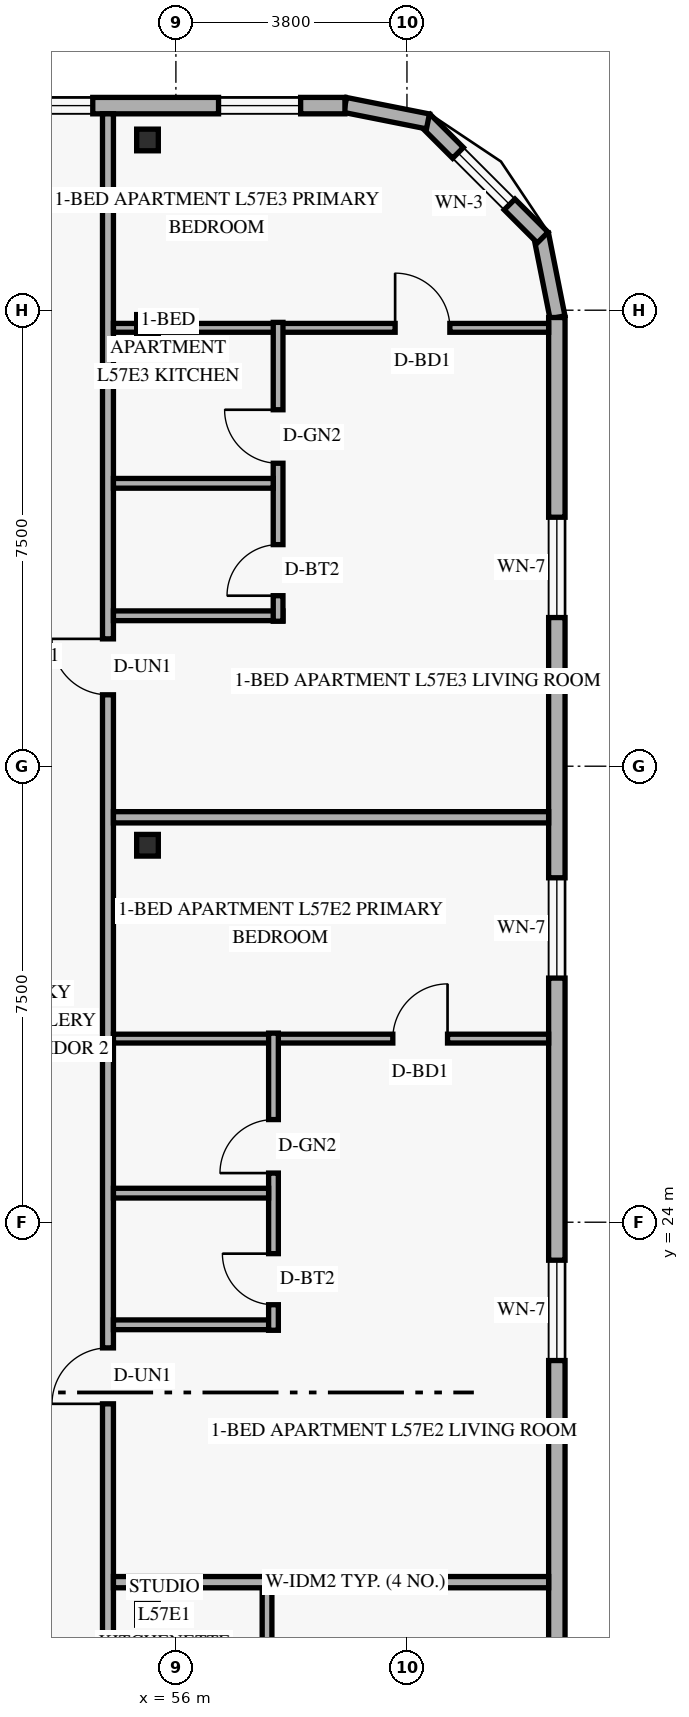
"""IFC4 building model, lengths in metres.
Left out: names, types, materials, properties, quantities, classifications, styles, units other than length and angle.
Written with IfcOpenShell. Run it as: python <this file> out.ifc"""

import sys

from ifc_helpers import new_model, si_unit, direction, frame, frame_2d, origin, origin_2d, place, context, subcontext, project, spatial, rectangle, hollow_rectangle, extrude, element, fill, save


model = new_model("IFC4")
c1 = context("Model", 3, precision=1e-05, world=origin(), true_north=direction((0.0, 1.0)))
c2 = subcontext(c1, "Body", "Model", "MODEL_VIEW")
j1 = project(units=[si_unit("LENGTHUNIT", "METRE"), si_unit("PLANEANGLEUNIT", "RADIAN")], contexts=[c1])
p1 = place(None, origin())
s1 = spatial("IfcSite", under=j1, at=p1, CompositionType="ELEMENT")
p2 = place(p1, origin())
s2 = spatial("IfcBuilding", under=s1, at=p2, CompositionType="ELEMENT")
p3 = place(p2, frame((0.0, 0.0, 220.2)))
s3 = spatial("IfcBuildingStorey", under=s2, at=p3, CompositionType="ELEMENT", Elevation=220.2)
for number, where, z_axis, x_axis in (
    (1, (55.428, 17.55, 0.0), (0.058, 0.0, 0.998), (0.0, 1.0, 0.0)),
    (2, (55.428, 30.2, 0.0), (0.058, 0.0, 0.998), (0.0, 1.0, 0.0)),
    (3, (55.428, 38.75, 0.0), (0.058, 0.0, 0.998), (0.0, 1.0, 0.0)),
    (4, (55.428, 41.8, 0.0), (0.058, 0.0, 0.998), (0.0, 1.0, 0.0)),
):
    element("IfcColumn", number, at=place(p3, frame(where, z_axis=z_axis, x_axis=x_axis)), inside=s3, PredefinedType="COLUMN", context=c2, shape_type="SweptSolid", body=[
        extrude(hollow_rectangle(XDim=0.356, YDim=0.356, WallThickness=0.016, at=origin_2d()), origin(), (0.0, 0.0, 1.0), 3.606),
    ])
p4 = place(p3, frame((62.276, 38.884, 0.0), z_axis=(0.0, 0.0, 1.0), x_axis=(-0.195135625965, 0.9807762678, 0.0)))
e5 = element("IfcWall", 5, at=p4, inside=s3, PredefinedType="SOLIDWALL", context=c2, shape_type="SweptSolid", body=[
    extrude(rectangle(XDim=1.389, YDim=0.25, at=frame_2d((0.694, 0.0))), origin(), (0.0, 0.0, 1.0), 3.36),
])
p5 = place(p3, frame((62.032, 40.195, 0.0), z_axis=(0.0, 0.0, 1.0), x_axis=(-0.707106781187, 0.707106781187, 0.0)))
e6 = element("IfcWall", 6, at=p5, inside=s3, PredefinedType="SOLIDWALL", context=c2, shape_type="SweptSolid", body=[
    extrude(rectangle(XDim=2.739, YDim=0.25, at=frame_2d((1.37, 0.0))), origin(), (0.0, 0.0, 1.0), 3.36),
])
p6 = place(p5, frame((0.77, 0.0, 0.85)))
e7 = element("IfcOpeningElement", 7, at=p6, cuts=e6, PredefinedType="OPENING", context=c2, shape_type="SweptSolid", body=[
    extrude(rectangle(XDim=1.2, YDim=1.5, at=frame_2d((0.6, 0.75))), frame((0.0, 0.135, 0.0), z_axis=(0.0, -1.0, 0.0), x_axis=(1.0, 0.0, 0.0)), (0.0, 0.0, 1.0), 0.27),
])
p7 = place(p3, frame((60.146, 42.105, 0.0), z_axis=(0.0, 0.0, 1.0), x_axis=(-0.980809899341, 0.19496651342, 0.0)))
e8 = element("IfcWall", 8, at=p7, inside=s3, PredefinedType="SOLIDWALL", context=c2, shape_type="SweptSolid", body=[
    extrude(rectangle(XDim=1.389, YDim=0.25, at=frame_2d((0.694, 0.0))), origin(), (0.0, 0.0, 1.0), 3.36),
])
p8 = place(p3, frame((62.265, 9.12, 0.0), z_axis=(0.0, 0.0, 1.0), x_axis=(0.0, 1.0, 0.0)))
e9 = element("IfcWall", 9, at=p8, inside=s3, PredefinedType="SOLIDWALL", context=c2, shape_type="SweptSolid", body=[
    extrude(rectangle(XDim=29.76, YDim=0.27, at=frame_2d((14.88, 0.0))), origin(), (0.0, 0.0, 1.0), 3.36),
])
p9 = place(p8, frame((3.655, 0.0, 0.85)))
e10 = element("IfcOpeningElement", 10, at=p9, cuts=e9, PredefinedType="OPENING", context=c2, shape_type="SweptSolid", body=[
    extrude(rectangle(XDim=1.65, YDim=1.6, at=frame_2d((0.825, 0.8))), frame((0.0, 0.145, 0.0), z_axis=(0.0, -1.0, 0.0), x_axis=(1.0, 0.0, 0.0)), (0.0, 0.0, 1.0), 0.29),
])
p10 = place(p8, frame((12.605, 0.0, 0.85)))
e11 = element("IfcOpeningElement", 11, at=p10, cuts=e9, PredefinedType="OPENING", context=c2, shape_type="SweptSolid", body=[
    extrude(rectangle(XDim=1.65, YDim=1.6, at=frame_2d((0.825, 0.8))), frame((0.0, 0.145, 0.0), z_axis=(0.0, -1.0, 0.0), x_axis=(1.0, 0.0, 0.0)), (0.0, 0.0, 1.0), 0.29),
])
p11 = place(p8, frame((18.895, 0.0, 0.85)))
e12 = element("IfcOpeningElement", 12, at=p11, cuts=e9, PredefinedType="OPENING", context=c2, shape_type="SweptSolid", body=[
    extrude(rectangle(XDim=1.65, YDim=1.6, at=frame_2d((0.825, 0.8))), frame((0.0, 0.145, 0.0), z_axis=(0.0, -1.0, 0.0), x_axis=(1.0, 0.0, 0.0)), (0.0, 0.0, 1.0), 0.29),
])
p12 = place(p8, frame((24.825, 0.0, 0.85)))
e13 = element("IfcOpeningElement", 13, at=p12, cuts=e9, PredefinedType="OPENING", context=c2, shape_type="SweptSolid", body=[
    extrude(rectangle(XDim=1.65, YDim=1.6, at=frame_2d((0.825, 0.8))), frame((0.0, 0.145, 0.0), z_axis=(0.0, -1.0, 0.0), x_axis=(1.0, 0.0, 0.0)), (0.0, 0.0, 1.0), 0.29),
])
p13 = place(p3, frame((58.78, 42.365, 0.0), z_axis=(0.0, 0.0, 1.0), x_axis=(-1.0, 0.0, 0.0)))
e14 = element("IfcWall", 14, at=p13, inside=s3, PredefinedType="SOLIDWALL", context=c2, shape_type="SweptSolid", body=[
    extrude(rectangle(XDim=32.96, YDim=0.27, at=frame_2d((16.48, 0.0))), origin(), (0.0, 0.0, 1.0), 3.36),
])
p14 = place(p13, frame((27.815, 0.0, 0.85)))
e15 = element("IfcOpeningElement", 15, at=p14, cuts=e14, PredefinedType="OPENING", context=c2, shape_type="SweptSolid", body=[
    extrude(rectangle(XDim=1.35, YDim=1.55, at=frame_2d((0.675, 0.775))), frame((0.0, 0.145, 0.0), z_axis=(0.0, -1.0, 0.0), x_axis=(1.0, 0.0, 0.0)), (0.0, 0.0, 1.0), 0.29),
])
p15 = place(p13, frame((15.022, 0.0, 0.85)))
e16 = element("IfcOpeningElement", 16, at=p15, cuts=e14, PredefinedType="OPENING", context=c2, shape_type="SweptSolid", body=[
    extrude(rectangle(XDim=1.35, YDim=1.55, at=frame_2d((0.675, 0.775))), frame((0.0, 0.145, 0.0), z_axis=(0.0, -1.0, 0.0), x_axis=(1.0, 0.0, 0.0)), (0.0, 0.0, 1.0), 0.29),
])
p16 = place(p13, frame((4.147, 0.0, 0.85)))
e17 = element("IfcOpeningElement", 17, at=p16, cuts=e14, PredefinedType="OPENING", context=c2, shape_type="SweptSolid", body=[
    extrude(rectangle(XDim=1.35, YDim=1.55, at=frame_2d((0.675, 0.775))), frame((0.0, 0.145, 0.0), z_axis=(0.0, -1.0, 0.0), x_axis=(1.0, 0.0, 0.0)), (0.0, 0.0, 1.0), 0.29),
])
p17 = place(p13, frame((0.729, 0.0, 0.85)))
e18 = element("IfcOpeningElement", 18, at=p17, cuts=e14, PredefinedType="OPENING", context=c2, shape_type="SweptSolid", body=[
    extrude(rectangle(XDim=1.35, YDim=1.55, at=frame_2d((0.675, 0.775))), frame((0.0, 0.145, 0.0), z_axis=(0.0, -1.0, 0.0), x_axis=(1.0, 0.0, 0.0)), (0.0, 0.0, 1.0), 0.29),
])
p18 = place(p3, frame((54.883, 5.77, 0.0), z_axis=(0.0, 0.0, 1.0), x_axis=(0.0, 1.0, 0.0)))
e19 = element("IfcWall", 19, at=p18, inside=s3, PredefinedType="STANDARD", context=c2, shape_type="SweptSolid", body=[
    extrude(rectangle(XDim=36.46, YDim=0.18, at=frame_2d((18.23, 0.0))), origin(), (0.0, 0.0, 1.0), 2.803),
])
p19 = place(p18, frame((6.37, 0.0, 0.0)))
e20 = element("IfcOpeningElement", 20, at=p19, cuts=e19, PredefinedType="OPENING", context=c2, shape_type="SweptSolid", body=[
    extrude(rectangle(XDim=0.92, YDim=2.15, at=frame_2d((0.46, 1.075))), frame((0.0, 0.1, 0.0), z_axis=(0.0, -1.0, 0.0), x_axis=(1.0, 0.0, 0.0)), (0.0, 0.0, 1.0), 0.2),
])
p20 = place(p18, frame((15.243, 0.0, 0.0)))
e21 = element("IfcOpeningElement", 21, at=p20, cuts=e19, PredefinedType="OPENING", context=c2, shape_type="SweptSolid", body=[
    extrude(rectangle(XDim=0.92, YDim=2.15, at=frame_2d((0.46, 1.075))), frame((0.0, 0.1, 0.0), z_axis=(0.0, -1.0, 0.0), x_axis=(1.0, 0.0, 0.0)), (0.0, 0.0, 1.0), 0.2),
])
p21 = place(p18, frame((26.905, 0.0, 0.0)))
e22 = element("IfcOpeningElement", 22, at=p21, cuts=e19, PredefinedType="OPENING", context=c2, shape_type="SweptSolid", body=[
    extrude(rectangle(XDim=0.92, YDim=2.15, at=frame_2d((0.46, 1.075))), frame((0.0, 0.1, 0.0), z_axis=(0.0, -1.0, 0.0), x_axis=(1.0, 0.0, 0.0)), (0.0, 0.0, 1.0), 0.2),
])
p22 = place(p3, frame((57.499, 13.35, 0.0), z_axis=(0.0, 0.0, 1.0), x_axis=(0.0, 1.0, 0.0)))
e23 = element("IfcWall", 23, at=p22, inside=s3, PredefinedType="PLUMBINGWALL", context=c2, shape_type="SweptSolid", body=[
    extrude(rectangle(XDim=4.73, YDim=0.16, at=frame_2d((2.365, 0.0))), origin(), (0.0, 0.0, 1.0), 3.36),
])
p23 = place(p22, frame((0.42, 0.0, 0.0)))
e24 = element("IfcOpeningElement", 24, at=p23, cuts=e23, PredefinedType="OPENING", context=c2, shape_type="SweptSolid", body=[
    extrude(rectangle(XDim=0.84, YDim=2.12, at=frame_2d((0.42, 1.06))), frame((0.0, 0.09, 0.0), z_axis=(0.0, -1.0, 0.0), x_axis=(1.0, 0.0, 0.0)), (0.0, 0.0, 1.0), 0.18),
])
p24 = place(p22, frame((2.513, 0.0, 0.0)))
e25 = element("IfcOpeningElement", 25, at=p24, cuts=e23, PredefinedType="OPENING", context=c2, shape_type="SweptSolid", body=[
    extrude(rectangle(XDim=0.88, YDim=2.12, at=frame_2d((0.44, 1.06))), frame((0.0, 0.09, 0.0), z_axis=(0.0, -1.0, 0.0), x_axis=(1.0, 0.0, 0.0)), (0.0, 0.0, 1.0), 0.18),
])
p25 = place(p3, frame((54.973, 18.08, 0.0), z_axis=(0.0, 0.0, 1.0), x_axis=(1.0, 0.0, 0.0)))
e26 = element("IfcWall", 26, at=p25, inside=s3, PredefinedType="PARTITIONING", context=c2, shape_type="SweptSolid", body=[
    extrude(rectangle(XDim=7.157, YDim=0.185, at=frame_2d((3.579, 0.0))), origin(), (0.0, 0.0, 1.0), 2.879),
])
p26 = place(p3, frame((54.973, 27.02, 0.0), z_axis=(0.0, 0.0, 1.0), x_axis=(1.0, 0.0, 0.0)))
e27 = element("IfcWall", 27, at=p26, inside=s3, PredefinedType="PARTITIONING", context=c2, shape_type="SweptSolid", body=[
    extrude(rectangle(XDim=7.157, YDim=0.145, at=frame_2d((3.579, 0.0))), origin(), (0.0, 0.0, 1.0), 2.879),
])
p27 = place(p26, frame((4.594, 0.0, 0.0)))
e28 = element("IfcOpeningElement", 28, at=p27, cuts=e27, PredefinedType="OPENING", context=c2, shape_type="SweptSolid", body=[
    extrude(rectangle(XDim=0.9, YDim=2.14, at=frame_2d((0.45, 1.07))), frame((0.0, 0.083, 0.0), z_axis=(0.0, -1.0, 0.0), x_axis=(1.0, 0.0, 0.0)), (0.0, 0.0, 1.0), 0.165),
])
p28 = place(p3, frame((54.973, 22.313, 0.0), z_axis=(0.0, 0.0, 1.0), x_axis=(1.0, 0.0, 0.0)))
e29 = element("IfcWall", 29, at=p28, inside=s3, PredefinedType="PLUMBINGWALL", context=c2, shape_type="SweptSolid", body=[
    extrude(rectangle(XDim=2.712, YDim=0.16, at=frame_2d((1.356, 0.0))), origin(), (0.0, 0.0, 1.0), 2.879),
])
p29 = place(p3, frame((57.605, 22.223, 0.0), z_axis=(0.0, 0.0, 1.0), x_axis=(0.0, 1.0, 0.0)))
e30 = element("IfcWall", 30, at=p29, inside=s3, PredefinedType="PLUMBINGWALL", context=c2, shape_type="SweptSolid", body=[
    extrude(rectangle(XDim=4.887, YDim=0.16, at=frame_2d((2.444, 0.0))), origin(), (0.0, 0.0, 1.0), 3.36),
])
p30 = place(p29, frame((0.42, 0.0, 0.0)))
e31 = element("IfcOpeningElement", 31, at=p30, cuts=e30, PredefinedType="OPENING", context=c2, shape_type="SweptSolid", body=[
    extrude(rectangle(XDim=0.84, YDim=2.12, at=frame_2d((0.42, 1.06))), frame((0.0, 0.09, 0.0), z_axis=(0.0, -1.0, 0.0), x_axis=(1.0, 0.0, 0.0)), (0.0, 0.0, 1.0), 0.18),
])
p31 = place(p29, frame((2.585, 0.0, 0.0)))
e32 = element("IfcOpeningElement", 32, at=p31, cuts=e30, PredefinedType="OPENING", context=c2, shape_type="SweptSolid", body=[
    extrude(rectangle(XDim=0.88, YDim=2.12, at=frame_2d((0.44, 1.06))), frame((0.0, 0.09, 0.0), z_axis=(0.0, -1.0, 0.0), x_axis=(1.0, 0.0, 0.0)), (0.0, 0.0, 1.0), 0.18),
])
p32 = place(p3, frame((54.973, 24.478, 0.0), z_axis=(0.0, 0.0, 1.0), x_axis=(1.0, 0.0, 0.0)))
e33 = element("IfcWall", 33, at=p32, inside=s3, PredefinedType="PLUMBINGWALL", context=c2, shape_type="SweptSolid", body=[
    extrude(rectangle(XDim=2.552, YDim=0.16, at=frame_2d((1.276, 0.0))), origin(), (0.0, 0.0, 1.0), 2.879),
])
p33 = place(p3, frame((54.973, 30.66, 0.0), z_axis=(0.0, 0.0, 1.0), x_axis=(1.0, 0.0, 0.0)))
e34 = element("IfcWall", 34, at=p33, inside=s3, PredefinedType="PARTITIONING", context=c2, shape_type="SweptSolid", body=[
    extrude(rectangle(XDim=7.157, YDim=0.185, at=frame_2d((3.579, 0.0))), origin(), (0.0, 0.0, 1.0), 2.879),
])
p34 = place(p3, frame((54.973, 38.71, 0.0), z_axis=(0.0, 0.0, 1.0), x_axis=(1.0, 0.0, 0.0)))
e35 = element("IfcWall", 35, at=p34, inside=s3, PredefinedType="PARTITIONING", context=c2, shape_type="SweptSolid", body=[
    extrude(rectangle(XDim=7.157, YDim=0.145, at=frame_2d((3.579, 0.0))), origin(), (0.0, 0.0, 1.0), 2.803),
])
p35 = place(p34, frame((4.633, 0.0, 0.0)))
e36 = element("IfcOpeningElement", 36, at=p35, cuts=e35, PredefinedType="OPENING", context=c2, shape_type="SweptSolid", body=[
    extrude(rectangle(XDim=0.9, YDim=2.14, at=frame_2d((0.45, 1.07))), frame((0.0, 0.083, 0.0), z_axis=(0.0, -1.0, 0.0), x_axis=(1.0, 0.0, 0.0)), (0.0, 0.0, 1.0), 0.165),
])
p36 = place(p3, frame((54.973, 33.975, 0.0), z_axis=(0.0, 0.0, 1.0), x_axis=(1.0, 0.0, 0.0)))
e37 = element("IfcWall", 37, at=p36, inside=s3, PredefinedType="PLUMBINGWALL", context=c2, shape_type="SweptSolid", body=[
    extrude(rectangle(XDim=2.788, YDim=0.16, at=frame_2d((1.394, 0.0))), origin(), (0.0, 0.0, 1.0), 2.879),
])
p37 = place(p3, frame((57.681, 33.885, 0.0), z_axis=(0.0, 0.0, 1.0), x_axis=(0.0, 1.0, 0.0)))
e38 = element("IfcWall", 38, at=p37, inside=s3, PredefinedType="PLUMBINGWALL", context=c2, shape_type="SweptSolid", body=[
    extrude(rectangle(XDim=4.916, YDim=0.16, at=frame_2d((2.458, 0.0))), origin(), (0.0, 0.0, 1.0), 3.36),
])
p38 = place(p37, frame((0.42, 0.0, 0.0)))
e39 = element("IfcOpeningElement", 39, at=p38, cuts=e38, PredefinedType="OPENING", context=c2, shape_type="SweptSolid", body=[
    extrude(rectangle(XDim=0.84, YDim=2.12, at=frame_2d((0.42, 1.06))), frame((0.0, 0.09, 0.0), z_axis=(0.0, -1.0, 0.0), x_axis=(1.0, 0.0, 0.0)), (0.0, 0.0, 1.0), 0.18),
])
p39 = place(p37, frame((2.598, 0.0, 0.0)))
e40 = element("IfcOpeningElement", 40, at=p39, cuts=e38, PredefinedType="OPENING", context=c2, shape_type="SweptSolid", body=[
    extrude(rectangle(XDim=0.88, YDim=2.12, at=frame_2d((0.44, 1.06))), frame((0.0, 0.09, 0.0), z_axis=(0.0, -1.0, 0.0), x_axis=(1.0, 0.0, 0.0)), (0.0, 0.0, 1.0), 0.18),
])
p40 = place(p3, frame((54.973, 36.153, 0.0), z_axis=(0.0, 0.0, 1.0), x_axis=(1.0, 0.0, 0.0)))
e41 = element("IfcWall", 41, at=p40, inside=s3, PredefinedType="PLUMBINGWALL", context=c2, shape_type="SweptSolid", body=[
    extrude(rectangle(XDim=2.628, YDim=0.16, at=frame_2d((1.314, 0.0))), origin(), (0.0, 0.0, 1.0), 2.879),
])
p41 = place(p6, origin())
e42 = element("IfcWindow", 42, at=p41, inside=s3, PartitioningType="SINGLE_PANEL", PredefinedType="WINDOW", context=c2, shape_type="SweptSolid", body=[
    extrude(rectangle(XDim=1.2, YDim=1.5, at=frame_2d((0.6, 0.75))), frame((0.0, 0.03, 0.0), z_axis=(0.0, -1.0, 0.0), x_axis=(1.0, 0.0, 0.0)), (0.0, 0.0, 1.0), 0.06),
])
fill(e7, e42)
p42 = place(p10, origin())
e43 = element("IfcWindow", 43, at=p42, inside=s3, PartitioningType="SINGLE_PANEL", PredefinedType="WINDOW", context=c2, shape_type="SweptSolid", body=[
    extrude(rectangle(XDim=1.65, YDim=1.6, at=frame_2d((0.825, 0.8))), frame((0.0, 0.03, 0.0), z_axis=(0.0, -1.0, 0.0), x_axis=(1.0, 0.0, 0.0)), (0.0, 0.0, 1.0), 0.06),
])
fill(e11, e43)
p43 = place(p11, origin())
e44 = element("IfcWindow", 44, at=p43, inside=s3, PartitioningType="SINGLE_PANEL", PredefinedType="WINDOW", context=c2, shape_type="SweptSolid", body=[
    extrude(rectangle(XDim=1.65, YDim=1.6, at=frame_2d((0.825, 0.8))), frame((0.0, 0.03, 0.0), z_axis=(0.0, -1.0, 0.0), x_axis=(1.0, 0.0, 0.0)), (0.0, 0.0, 1.0), 0.06),
])
fill(e12, e44)
p44 = place(p12, origin())
e45 = element("IfcWindow", 45, at=p44, inside=s3, PartitioningType="SINGLE_PANEL", PredefinedType="WINDOW", context=c2, shape_type="SweptSolid", body=[
    extrude(rectangle(XDim=1.65, YDim=1.6, at=frame_2d((0.825, 0.8))), frame((0.0, 0.03, 0.0), z_axis=(0.0, -1.0, 0.0), x_axis=(1.0, 0.0, 0.0)), (0.0, 0.0, 1.0), 0.06),
])
fill(e13, e45)
p45 = place(p16, origin())
e46 = element("IfcWindow", 46, at=p45, inside=s3, PartitioningType="SINGLE_PANEL", PredefinedType="WINDOW", context=c2, shape_type="SweptSolid", body=[
    extrude(rectangle(XDim=1.35, YDim=1.55, at=frame_2d((0.675, 0.775))), frame((0.0, 0.03, 0.0), z_axis=(0.0, -1.0, 0.0), x_axis=(1.0, 0.0, 0.0)), (0.0, 0.0, 1.0), 0.06),
])
fill(e17, e46)
p46 = place(p17, origin())
e47 = element("IfcWindow", 47, at=p46, inside=s3, PartitioningType="SINGLE_PANEL", PredefinedType="WINDOW", context=c2, shape_type="SweptSolid", body=[
    extrude(rectangle(XDim=1.35, YDim=1.55, at=frame_2d((0.675, 0.775))), frame((0.0, 0.03, 0.0), z_axis=(0.0, -1.0, 0.0), x_axis=(1.0, 0.0, 0.0)), (0.0, 0.0, 1.0), 0.06),
])
fill(e18, e47)
p47 = place(p20, origin())
e48 = element("IfcDoor", 48, at=p47, inside=s3, OperationType="SINGLE_SWING_LEFT", PredefinedType="DOOR", context=c2, shape_type="SweptSolid", body=[
    extrude(rectangle(XDim=0.92, YDim=2.15, at=frame_2d((0.46, 1.075))), frame((0.0, 0.025, 0.0), z_axis=(0.0, -1.0, 0.0), x_axis=(1.0, 0.0, 0.0)), (0.0, 0.0, 1.0), 0.05),
])
fill(e21, e48)
p48 = place(p30, origin())
e49 = element("IfcDoor", 49, at=p48, inside=s3, OperationType="SINGLE_SWING_RIGHT", PredefinedType="DOOR", context=c2, shape_type="SweptSolid", body=[
    extrude(rectangle(XDim=0.84, YDim=2.12, at=frame_2d((0.42, 1.06))), frame((0.0, 0.025, 0.0), z_axis=(0.0, -1.0, 0.0), x_axis=(1.0, 0.0, 0.0)), (0.0, 0.0, 1.0), 0.05),
])
fill(e31, e49)
p49 = place(p31, origin())
e50 = element("IfcDoor", 50, at=p49, inside=s3, OperationType="SINGLE_SWING_LEFT", PredefinedType="DOOR", context=c2, shape_type="SweptSolid", body=[
    extrude(rectangle(XDim=0.88, YDim=2.12, at=frame_2d((0.44, 1.06))), frame((0.0, 0.025, 0.0), z_axis=(0.0, -1.0, 0.0), x_axis=(1.0, 0.0, 0.0)), (0.0, 0.0, 1.0), 0.05),
])
fill(e32, e50)
p50 = place(p27, origin())
e51 = element("IfcDoor", 51, at=p50, inside=s3, OperationType="SINGLE_SWING_RIGHT", PredefinedType="DOOR", context=c2, shape_type="SweptSolid", body=[
    extrude(rectangle(XDim=0.9, YDim=2.14, at=frame_2d((0.45, 1.07))), frame((0.0, 0.025, 0.0), z_axis=(0.0, -1.0, 0.0), x_axis=(1.0, 0.0, 0.0)), (0.0, 0.0, 1.0), 0.05),
])
fill(e28, e51)
p51 = place(p21, origin())
e52 = element("IfcDoor", 52, at=p51, inside=s3, OperationType="SINGLE_SWING_RIGHT", PredefinedType="DOOR", context=c2, shape_type="SweptSolid", body=[
    extrude(rectangle(XDim=0.92, YDim=2.15, at=frame_2d((0.46, 1.075))), frame((0.0, 0.025, 0.0), z_axis=(0.0, -1.0, 0.0), x_axis=(1.0, 0.0, 0.0)), (0.0, 0.0, 1.0), 0.05),
])
fill(e22, e52)
p52 = place(p38, origin())
e53 = element("IfcDoor", 53, at=p52, inside=s3, OperationType="SINGLE_SWING_LEFT", PredefinedType="DOOR", context=c2, shape_type="SweptSolid", body=[
    extrude(rectangle(XDim=0.84, YDim=2.12, at=frame_2d((0.42, 1.06))), frame((0.0, 0.025, 0.0), z_axis=(0.0, -1.0, 0.0), x_axis=(1.0, 0.0, 0.0)), (0.0, 0.0, 1.0), 0.05),
])
fill(e39, e53)
p53 = place(p39, origin())
e54 = element("IfcDoor", 54, at=p53, inside=s3, OperationType="SINGLE_SWING_RIGHT", PredefinedType="DOOR", context=c2, shape_type="SweptSolid", body=[
    extrude(rectangle(XDim=0.88, YDim=2.12, at=frame_2d((0.44, 1.06))), frame((0.0, 0.025, 0.0), z_axis=(0.0, -1.0, 0.0), x_axis=(1.0, 0.0, 0.0)), (0.0, 0.0, 1.0), 0.05),
])
fill(e40, e54)
p54 = place(p35, origin())
e55 = element("IfcDoor", 55, at=p54, inside=s3, OperationType="SINGLE_SWING_LEFT", PredefinedType="DOOR", context=c2, shape_type="SweptSolid", body=[
    extrude(rectangle(XDim=0.9, YDim=2.14, at=frame_2d((0.45, 1.07))), frame((0.0, 0.025, 0.0), z_axis=(0.0, -1.0, 0.0), x_axis=(1.0, 0.0, 0.0)), (0.0, 0.0, 1.0), 0.05),
])
fill(e36, e55)
save(model, sys.argv[1])
